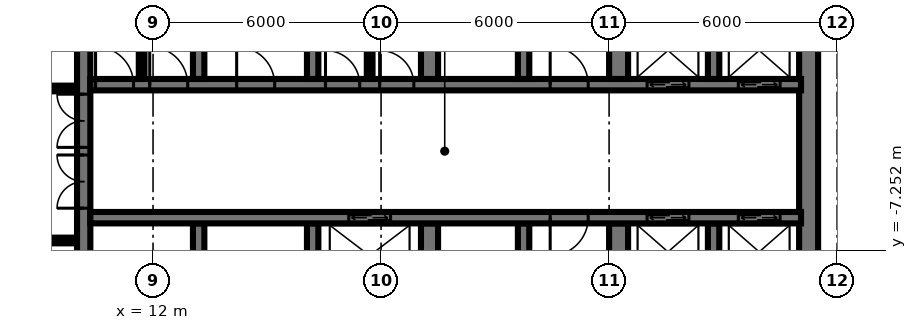
"""IFC4 building model, lengths in metres.
Left out: names, types, materials, properties, quantities, classifications, styles, units other than length and angle.
Written with IfcOpenShell. Run it as: python <this file> out.ifc"""

import sys

from ifc_helpers import new_model, si_unit, direction, frame, frame_2d, origin, place, context, subcontext, project, spatial, rectangle, extrude, element, fill, save


model = new_model("IFC4")
c1 = context("Model", 3, precision=1e-05, world=origin(), true_north=direction((0.0, 1.0)))
c2 = subcontext(c1, "Body", "Model", "MODEL_VIEW")
j1 = project(units=[si_unit("LENGTHUNIT", "METRE"), si_unit("PLANEANGLEUNIT", "RADIAN")], contexts=[c1])
p1 = place(None, origin())
s1 = spatial("IfcSite", under=j1, at=p1, CompositionType="ELEMENT")
p2 = place(p1, origin())
s2 = spatial("IfcBuilding", under=s1, at=p2, CompositionType="ELEMENT")
p3 = place(p2, frame((0.0, 0.0, 18.0)))
s3 = spatial("IfcBuildingStorey", under=s2, at=p3, CompositionType="ELEMENT", Elevation=18.0)
p4 = place(p3, frame((10.175, -14.55, 0.0), z_axis=(0.0, 0.0, 1.0), x_axis=(0.0, 1.0, 0.0)))
e1 = element("IfcWall", 1, at=p4, inside=s3, PredefinedType="SHEAR", context=c2, shape_type="SweptSolid", body=[
    extrude(rectangle(XDim=14.1, YDim=0.35, at=frame_2d((7.05, 0.0))), origin(), (0.0, 0.0, 1.0), 6.0),
])
p5 = place(p4, frame((8.4, 0.0, 0.0)))
e2 = element("IfcOpeningElement", 2, at=p5, cuts=e1, PredefinedType="OPENING", context=c2, shape_type="SweptSolid", body=[
    extrude(rectangle(XDim=1.4, YDim=2.4, at=frame_2d((0.7, 1.2))), frame((0.0, 0.185, 0.0), z_axis=(0.0, -1.0, 0.0), x_axis=(1.0, 0.0, 0.0)), (0.0, 0.0, 1.0), 0.37),
])
p6 = place(p4, frame((10.0, 0.0, 0.0)))
e3 = element("IfcOpeningElement", 3, at=p6, cuts=e1, PredefinedType="OPENING", context=c2, shape_type="SweptSolid", body=[
    extrude(rectangle(XDim=1.4, YDim=2.4, at=frame_2d((0.7, 1.2))), frame((0.0, 0.185, 0.0), z_axis=(0.0, -1.0, 0.0), x_axis=(1.0, 0.0, 0.0)), (0.0, 0.0, 1.0), 0.37),
])
p7 = place(p4, frame((4.0, 0.0, 0.0)))
e4 = element("IfcOpeningElement", 4, at=p7, cuts=e1, PredefinedType="OPENING", context=c2, shape_type="SweptSolid", body=[
    extrude(rectangle(XDim=1.2, YDim=2.1, at=frame_2d((0.6, 1.05))), frame((0.0, 0.185, 0.0), z_axis=(0.0, -1.0, 0.0), x_axis=(1.0, 0.0, 0.0)), (0.0, 0.0, 1.0), 0.37),
])
p8 = place(p3, frame((29.25, -14.55, 0.0), z_axis=(0.0, 0.0, 1.0), x_axis=(0.0, 1.0, 0.0)))
e5 = element("IfcWall", 5, at=p8, inside=s3, PredefinedType="SHEAR", context=c2, shape_type="SweptSolid", body=[
    extrude(rectangle(XDim=14.1, YDim=0.5, at=frame_2d((7.05, 0.0))), origin(), (0.0, 0.0, 1.0), 6.0),
])
p9 = place(p3, frame((10.35, -2.9, 0.0), z_axis=(0.0, 0.0, 1.0), x_axis=(1.0, 0.0, 0.0)))
e6 = element("IfcWall", 6, at=p9, inside=s3, PredefinedType="SHEAR", context=c2, shape_type="SweptSolid", body=[
    extrude(rectangle(XDim=18.7, YDim=0.3, at=frame_2d((9.35, 0.0))), origin(), (0.0, 0.0, 1.0), 6.0),
])
p10 = place(p9, frame((14.65, 0.0, 0.0)))
e7 = element("IfcOpeningElement", 7, at=p10, cuts=e6, PredefinedType="OPENING", context=c2, shape_type="SweptSolid", body=[
    extrude(rectangle(XDim=1.1, YDim=2.1, at=frame_2d((0.55, 1.05))), frame((0.0, 0.16, 0.0), z_axis=(0.0, -1.0, 0.0), x_axis=(1.0, 0.0, 0.0)), (0.0, 0.0, 1.0), 0.32),
])
p11 = place(p9, frame((17.05, 0.0, 0.0)))
e8 = element("IfcOpeningElement", 8, at=p11, cuts=e6, PredefinedType="OPENING", context=c2, shape_type="SweptSolid", body=[
    extrude(rectangle(XDim=1.1, YDim=2.1, at=frame_2d((0.55, 1.05))), frame((0.0, 0.16, 0.0), z_axis=(0.0, -1.0, 0.0), x_axis=(1.0, 0.0, 0.0)), (0.0, 0.0, 1.0), 0.32),
])
p12 = place(p9, frame((6.188, 0.0, 0.0)))
e9 = element("IfcOpeningElement", 9, at=p12, cuts=e6, PredefinedType="OPENING", context=c2, shape_type="SweptSolid", body=[
    extrude(rectangle(XDim=0.9, YDim=2.1, at=frame_2d((0.45, 1.05))), frame((0.0, 0.16, 0.0), z_axis=(0.0, -1.0, 0.0), x_axis=(1.0, 0.0, 0.0)), (0.0, 0.0, 1.0), 0.32),
])
p13 = place(p9, frame((7.613, 0.0, 0.0)))
e10 = element("IfcOpeningElement", 10, at=p13, cuts=e6, PredefinedType="OPENING", context=c2, shape_type="SweptSolid", body=[
    extrude(rectangle(XDim=0.9, YDim=2.1, at=frame_2d((0.45, 1.05))), frame((0.0, 0.16, 0.0), z_axis=(0.0, -1.0, 0.0), x_axis=(1.0, 0.0, 0.0)), (0.0, 0.0, 1.0), 0.32),
])
p14 = place(p9, frame((0.137, 0.0, 0.0)))
e11 = element("IfcOpeningElement", 11, at=p14, cuts=e6, PredefinedType="OPENING", context=c2, shape_type="SweptSolid", body=[
    extrude(rectangle(XDim=1.0, YDim=2.1, at=frame_2d((0.5, 1.05))), frame((0.0, 0.16, 0.0), z_axis=(0.0, -1.0, 0.0), x_axis=(1.0, 0.0, 0.0)), (0.0, 0.0, 1.0), 0.32),
])
p15 = place(p9, frame((1.562, 0.0, 0.0)))
e12 = element("IfcOpeningElement", 12, at=p15, cuts=e6, PredefinedType="OPENING", context=c2, shape_type="SweptSolid", body=[
    extrude(rectangle(XDim=1.0, YDim=2.1, at=frame_2d((0.5, 1.05))), frame((0.0, 0.16, 0.0), z_axis=(0.0, -1.0, 0.0), x_axis=(1.0, 0.0, 0.0)), (0.0, 0.0, 1.0), 0.32),
])
p16 = place(p9, frame((3.85, 0.0, 0.0)))
e13 = element("IfcOpeningElement", 13, at=p16, cuts=e6, PredefinedType="OPENING", context=c2, shape_type="SweptSolid", body=[
    extrude(rectangle(XDim=1.0, YDim=2.1, at=frame_2d((0.5, 1.05))), frame((0.0, 0.16, 0.0), z_axis=(0.0, -1.0, 0.0), x_axis=(1.0, 0.0, 0.0)), (0.0, 0.0, 1.0), 0.32),
])
p17 = place(p9, frame((12.1, 0.0, 0.0)))
e14 = element("IfcOpeningElement", 14, at=p17, cuts=e6, PredefinedType="OPENING", context=c2, shape_type="SweptSolid", body=[
    extrude(rectangle(XDim=1.0, YDim=2.1, at=frame_2d((0.5, 1.05))), frame((0.0, 0.16, 0.0), z_axis=(0.0, -1.0, 0.0), x_axis=(1.0, 0.0, 0.0)), (0.0, 0.0, 1.0), 0.32),
])
p18 = place(p3, frame((10.35, -6.4, 0.0), z_axis=(0.0, 0.0, 1.0), x_axis=(1.0, 0.0, 0.0)))
e15 = element("IfcWall", 15, at=p18, inside=s3, PredefinedType="SHEAR", context=c2, shape_type="SweptSolid", body=[
    extrude(rectangle(XDim=18.7, YDim=0.3, at=frame_2d((9.35, 0.0))), origin(), (0.0, 0.0, 1.0), 6.0),
])
p19 = place(p18, frame((14.65, 0.0, 0.0)))
e16 = element("IfcOpeningElement", 16, at=p19, cuts=e15, PredefinedType="OPENING", context=c2, shape_type="SweptSolid", body=[
    extrude(rectangle(XDim=1.1, YDim=2.1, at=frame_2d((0.55, 1.05))), frame((0.0, 0.16, 0.0), z_axis=(0.0, -1.0, 0.0), x_axis=(1.0, 0.0, 0.0)), (0.0, 0.0, 1.0), 0.32),
])
p20 = place(p18, frame((17.05, 0.0, 0.0)))
e17 = element("IfcOpeningElement", 17, at=p20, cuts=e15, PredefinedType="OPENING", context=c2, shape_type="SweptSolid", body=[
    extrude(rectangle(XDim=1.1, YDim=2.1, at=frame_2d((0.55, 1.05))), frame((0.0, 0.16, 0.0), z_axis=(0.0, -1.0, 0.0), x_axis=(1.0, 0.0, 0.0)), (0.0, 0.0, 1.0), 0.32),
])
p21 = place(p18, frame((6.8, 0.0, 0.0)))
e18 = element("IfcOpeningElement", 18, at=p21, cuts=e15, PredefinedType="OPENING", context=c2, shape_type="SweptSolid", body=[
    extrude(rectangle(XDim=1.1, YDim=2.1, at=frame_2d((0.55, 1.05))), frame((0.0, 0.16, 0.0), z_axis=(0.0, -1.0, 0.0), x_axis=(1.0, 0.0, 0.0)), (0.0, 0.0, 1.0), 0.32),
])
p22 = place(p18, frame((12.1, 0.0, 0.0)))
e19 = element("IfcOpeningElement", 19, at=p22, cuts=e15, PredefinedType="OPENING", context=c2, shape_type="SweptSolid", body=[
    extrude(rectangle(XDim=1.0, YDim=2.1, at=frame_2d((0.5, 1.05))), frame((0.0, 0.16, 0.0), z_axis=(0.0, -1.0, 0.0), x_axis=(1.0, 0.0, 0.0)), (0.0, 0.0, 1.0), 0.32),
])
for number, where, z_axis, x_axis in (
    (20, (13.2, -2.75, 0.0), (0.0, 0.0, 1.0), (0.0, 1.0, 0.0)),
    (21, (13.2, -8.85, 0.0), (0.0, 0.0, 1.0), (0.0, 1.0, 0.0)),
    (22, (16.2, -2.75, 0.0), (0.0, 0.0, 1.0), (0.0, 1.0, 0.0)),
    (23, (16.2, -8.85, 0.0), (0.0, 0.0, 1.0), (0.0, 1.0, 0.0)),
):
    element("IfcWall", number, at=place(p3, frame(where, z_axis=z_axis, x_axis=x_axis)), inside=s3, PredefinedType="SHEAR", context=c2, shape_type="SweptSolid", body=[
        extrude(rectangle(XDim=2.3, YDim=0.3, at=frame_2d((1.15, 0.0))), origin(), (0.0, 0.0, 1.0), 6.0),
    ])
for number, where, z_axis, x_axis in (
    (24, (19.275, -2.75, 0.0), (0.0, 0.0, 1.0), (0.0, 1.0, 0.0)),
    (25, (19.275, -8.85, 0.0), (0.0, 0.0, 1.0), (0.0, 1.0, 0.0)),
):
    element("IfcWall", number, at=place(p3, frame(where, z_axis=z_axis, x_axis=x_axis)), inside=s3, PredefinedType="SHEAR", context=c2, shape_type="SweptSolid", body=[
        extrude(rectangle(XDim=2.3, YDim=0.45, at=frame_2d((1.15, 0.0))), origin(), (0.0, 0.0, 1.0), 6.0),
    ])
for number, where, z_axis, x_axis in (
    (26, (21.75, -2.75, 0.0), (0.0, 0.0, 1.0), (0.0, 1.0, 0.0)),
    (27, (21.75, -8.85, 0.0), (0.0, 0.0, 1.0), (0.0, 1.0, 0.0)),
):
    element("IfcWall", number, at=place(p3, frame(where, z_axis=z_axis, x_axis=x_axis)), inside=s3, PredefinedType="SHEAR", context=c2, shape_type="SweptSolid", body=[
        extrude(rectangle(XDim=2.3, YDim=0.3, at=frame_2d((1.15, 0.0))), origin(), (0.0, 0.0, 1.0), 6.0),
    ])
for number, where, z_axis, x_axis in (
    (28, (24.25, -2.75, 0.0), (0.0, 0.0, 1.0), (0.0, 1.0, 0.0)),
    (29, (24.25, -8.85, 0.0), (0.0, 0.0, 1.0), (0.0, 1.0, 0.0)),
):
    element("IfcWall", number, at=place(p3, frame(where, z_axis=z_axis, x_axis=x_axis)), inside=s3, PredefinedType="SHEAR", context=c2, shape_type="SweptSolid", body=[
        extrude(rectangle(XDim=2.3, YDim=0.5, at=frame_2d((1.15, 0.0))), origin(), (0.0, 0.0, 1.0), 6.0),
    ])
for number, where, z_axis, x_axis in (
    (30, (26.75, -2.75, 0.0), (0.0, 0.0, 1.0), (0.0, 1.0, 0.0)),
    (31, (26.75, -8.85, 0.0), (0.0, 0.0, 1.0), (0.0, 1.0, 0.0)),
):
    element("IfcWall", number, at=place(p3, frame(where, z_axis=z_axis, x_axis=x_axis)), inside=s3, PredefinedType="SHEAR", context=c2, shape_type="SweptSolid", body=[
        extrude(rectangle(XDim=2.3, YDim=0.3, at=frame_2d((1.15, 0.0))), origin(), (0.0, 0.0, 1.0), 6.0),
    ])
for number, where, z_axis, x_axis in (
    (32, (17.7, -2.75, 0.0), (0.0, 0.0, 1.0), (0.0, 1.0, 0.0)),
    (33, (11.7, -2.75, 0.0), (0.0, 0.0, 1.0), (0.0, 1.0, 0.0)),
):
    element("IfcWall", number, at=place(p3, frame(where, z_axis=z_axis, x_axis=x_axis)), inside=s3, PredefinedType="PARTITIONING", context=c2, shape_type="SweptSolid", body=[
        extrude(rectangle(XDim=2.3, YDim=0.15, at=frame_2d((1.15, 0.0))), origin(), (0.0, 0.0, 1.0), 5.7),
    ])
p23 = place(p3, frame((-9.95, -7.0, 0.0), z_axis=(0.0, 0.0, 1.0), x_axis=(1.0, 0.0, 0.0)))
e34 = element("IfcWall", 34, at=p23, inside=s3, PredefinedType="PARTITIONING", context=c2, shape_type="SweptSolid", body=[
    extrude(rectangle(XDim=19.9, YDim=0.15, at=frame_2d((9.95, 0.0))), origin(), (0.0, 0.0, 1.0), 5.55),
])
p24 = place(p23, frame((9.45, 0.0, 0.0)))
e35 = element("IfcOpeningElement", 35, at=p24, cuts=e34, PredefinedType="OPENING", context=c2, shape_type="SweptSolid", body=[
    extrude(rectangle(XDim=1.0, YDim=2.1, at=frame_2d((0.5, 1.05))), frame((0.0, 0.085, 0.0), z_axis=(0.0, -1.0, 0.0), x_axis=(1.0, 0.0, 0.0)), (0.0, 0.0, 1.0), 0.17),
])
p25 = place(p23, frame((2.0, 0.0, 0.0)))
e36 = element("IfcOpeningElement", 36, at=p25, cuts=e34, PredefinedType="OPENING", context=c2, shape_type="SweptSolid", body=[
    extrude(rectangle(XDim=1.0, YDim=2.1, at=frame_2d((0.5, 1.05))), frame((0.0, 0.085, 0.0), z_axis=(0.0, -1.0, 0.0), x_axis=(1.0, 0.0, 0.0)), (0.0, 0.0, 1.0), 0.17),
])
p26 = place(p3, frame((-9.95, -3.0, 0.0), z_axis=(0.0, 0.0, 1.0), x_axis=(1.0, 0.0, 0.0)))
e37 = element("IfcWall", 37, at=p26, inside=s3, PredefinedType="PARTITIONING", context=c2, shape_type="SweptSolid", body=[
    extrude(rectangle(XDim=19.9, YDim=0.15, at=frame_2d((9.95, 0.0))), origin(), (0.0, 0.0, 1.0), 5.55),
])
p27 = place(p26, frame((2.0, 0.0, 0.0)))
e38 = element("IfcOpeningElement", 38, at=p27, cuts=e37, PredefinedType="OPENING", context=c2, shape_type="SweptSolid", body=[
    extrude(rectangle(XDim=1.0, YDim=2.1, at=frame_2d((0.5, 1.05))), frame((0.0, 0.085, 0.0), z_axis=(0.0, -1.0, 0.0), x_axis=(1.0, 0.0, 0.0)), (0.0, 0.0, 1.0), 0.17),
])
p28 = place(p26, frame((11.9, 0.0, 0.0)))
e39 = element("IfcOpeningElement", 39, at=p28, cuts=e37, PredefinedType="OPENING", context=c2, shape_type="SweptSolid", body=[
    extrude(rectangle(XDim=1.0, YDim=2.1, at=frame_2d((0.5, 1.05))), frame((0.0, 0.085, 0.0), z_axis=(0.0, -1.0, 0.0), x_axis=(1.0, 0.0, 0.0)), (0.0, 0.0, 1.0), 0.17),
])
p29 = place(p26, frame((16.9, 0.0, 0.0)))
e40 = element("IfcOpeningElement", 40, at=p29, cuts=e37, PredefinedType="OPENING", context=c2, shape_type="SweptSolid", body=[
    extrude(rectangle(XDim=1.0, YDim=2.1, at=frame_2d((0.5, 1.05))), frame((0.0, 0.085, 0.0), z_axis=(0.0, -1.0, 0.0), x_axis=(1.0, 0.0, 0.0)), (0.0, 0.0, 1.0), 0.17),
])
p30 = place(p10, origin())
e41 = element("IfcDoor", 41, at=p30, inside=s3, OperationType="DOUBLE_DOOR_SLIDING", PredefinedType="USERDEFINED", context=c2, shape_type="SweptSolid", body=[
    extrude(rectangle(XDim=1.1, YDim=2.1, at=frame_2d((0.55, 1.05))), frame((0.0, 0.025, 0.0), z_axis=(0.0, -1.0, 0.0), x_axis=(1.0, 0.0, 0.0)), (0.0, 0.0, 1.0), 0.05),
])
fill(e7, e41)
p31 = place(p11, origin())
e42 = element("IfcDoor", 42, at=p31, inside=s3, OperationType="DOUBLE_DOOR_SLIDING", PredefinedType="USERDEFINED", context=c2, shape_type="SweptSolid", body=[
    extrude(rectangle(XDim=1.1, YDim=2.1, at=frame_2d((0.55, 1.05))), frame((0.0, 0.025, 0.0), z_axis=(0.0, -1.0, 0.0), x_axis=(1.0, 0.0, 0.0)), (0.0, 0.0, 1.0), 0.05),
])
fill(e8, e42)
p32 = place(p19, origin())
e43 = element("IfcDoor", 43, at=p32, inside=s3, OperationType="DOUBLE_DOOR_SLIDING", PredefinedType="USERDEFINED", context=c2, shape_type="SweptSolid", body=[
    extrude(rectangle(XDim=1.1, YDim=2.1, at=frame_2d((0.55, 1.05))), frame((0.0, 0.025, 0.0), z_axis=(0.0, -1.0, 0.0), x_axis=(1.0, 0.0, 0.0)), (0.0, 0.0, 1.0), 0.05),
])
fill(e16, e43)
p33 = place(p20, origin())
e44 = element("IfcDoor", 44, at=p33, inside=s3, OperationType="DOUBLE_DOOR_SLIDING", PredefinedType="USERDEFINED", context=c2, shape_type="SweptSolid", body=[
    extrude(rectangle(XDim=1.1, YDim=2.1, at=frame_2d((0.55, 1.05))), frame((0.0, 0.025, 0.0), z_axis=(0.0, -1.0, 0.0), x_axis=(1.0, 0.0, 0.0)), (0.0, 0.0, 1.0), 0.05),
])
fill(e17, e44)
p34 = place(p21, origin())
e45 = element("IfcDoor", 45, at=p34, inside=s3, OperationType="DOUBLE_DOOR_SLIDING", PredefinedType="USERDEFINED", context=c2, shape_type="SweptSolid", body=[
    extrude(rectangle(XDim=1.1, YDim=2.1, at=frame_2d((0.55, 1.05))), frame((0.0, 0.025, 0.0), z_axis=(0.0, -1.0, 0.0), x_axis=(1.0, 0.0, 0.0)), (0.0, 0.0, 1.0), 0.05),
])
fill(e18, e45)
p35 = place(p5, origin())
e46 = element("IfcDoor", 46, at=p35, inside=s3, OperationType="DOUBLE_DOOR_SINGLE_SWING", PredefinedType="DOOR", context=c2, shape_type="SweptSolid", body=[
    extrude(rectangle(XDim=1.4, YDim=2.4, at=frame_2d((0.7, 1.2))), frame((0.0, 0.025, 0.0), z_axis=(0.0, -1.0, 0.0), x_axis=(1.0, 0.0, 0.0)), (0.0, 0.0, 1.0), 0.05),
])
fill(e2, e46)
p36 = place(p6, origin())
e47 = element("IfcDoor", 47, at=p36, inside=s3, OperationType="DOUBLE_DOOR_SINGLE_SWING", PredefinedType="DOOR", context=c2, shape_type="SweptSolid", body=[
    extrude(rectangle(XDim=1.4, YDim=2.4, at=frame_2d((0.7, 1.2))), frame((0.0, 0.025, 0.0), z_axis=(0.0, -1.0, 0.0), x_axis=(1.0, 0.0, 0.0)), (0.0, 0.0, 1.0), 0.05),
])
fill(e3, e47)
p37 = place(p12, origin())
e48 = element("IfcDoor", 48, at=p37, inside=s3, OperationType="SINGLE_SWING_RIGHT", PredefinedType="DOOR", context=c2, shape_type="SweptSolid", body=[
    extrude(rectangle(XDim=0.9, YDim=2.1, at=frame_2d((0.45, 1.05))), frame((0.0, 0.025, 0.0), z_axis=(0.0, -1.0, 0.0), x_axis=(1.0, 0.0, 0.0)), (0.0, 0.0, 1.0), 0.05),
])
fill(e9, e48)
p38 = place(p13, origin())
e49 = element("IfcDoor", 49, at=p38, inside=s3, OperationType="SINGLE_SWING_RIGHT", PredefinedType="DOOR", context=c2, shape_type="SweptSolid", body=[
    extrude(rectangle(XDim=0.9, YDim=2.1, at=frame_2d((0.45, 1.05))), frame((0.0, 0.025, 0.0), z_axis=(0.0, -1.0, 0.0), x_axis=(1.0, 0.0, 0.0)), (0.0, 0.0, 1.0), 0.05),
])
fill(e10, e49)
p39 = place(p14, origin())
e50 = element("IfcDoor", 50, at=p39, inside=s3, OperationType="SINGLE_SWING_RIGHT", PredefinedType="DOOR", context=c2, shape_type="SweptSolid", body=[
    extrude(rectangle(XDim=1.0, YDim=2.1, at=frame_2d((0.5, 1.05))), frame((0.0, 0.025, 0.0), z_axis=(0.0, -1.0, 0.0), x_axis=(1.0, 0.0, 0.0)), (0.0, 0.0, 1.0), 0.05),
])
fill(e11, e50)
p40 = place(p15, origin())
e51 = element("IfcDoor", 51, at=p40, inside=s3, OperationType="SINGLE_SWING_RIGHT", PredefinedType="DOOR", context=c2, shape_type="SweptSolid", body=[
    extrude(rectangle(XDim=1.0, YDim=2.1, at=frame_2d((0.5, 1.05))), frame((0.0, 0.025, 0.0), z_axis=(0.0, -1.0, 0.0), x_axis=(1.0, 0.0, 0.0)), (0.0, 0.0, 1.0), 0.05),
])
fill(e12, e51)
p41 = place(p16, origin())
e52 = element("IfcDoor", 52, at=p41, inside=s3, OperationType="SINGLE_SWING_RIGHT", PredefinedType="DOOR", context=c2, shape_type="SweptSolid", body=[
    extrude(rectangle(XDim=1.0, YDim=2.1, at=frame_2d((0.5, 1.05))), frame((0.0, 0.025, 0.0), z_axis=(0.0, -1.0, 0.0), x_axis=(1.0, 0.0, 0.0)), (0.0, 0.0, 1.0), 0.05),
])
fill(e13, e52)
p42 = place(p17, origin())
e53 = element("IfcDoor", 53, at=p42, inside=s3, OperationType="SINGLE_SWING_RIGHT", PredefinedType="DOOR", context=c2, shape_type="SweptSolid", body=[
    extrude(rectangle(XDim=1.0, YDim=2.1, at=frame_2d((0.5, 1.05))), frame((0.0, 0.025, 0.0), z_axis=(0.0, -1.0, 0.0), x_axis=(1.0, 0.0, 0.0)), (0.0, 0.0, 1.0), 0.05),
])
fill(e14, e53)
p43 = place(p22, frame((0.5, 0.0, 0.0), z_axis=(0.0, 0.0, 1.0), x_axis=(-1.0, 0.0, 0.0)))
e54 = element("IfcDoor", 54, at=p43, inside=s3, OperationType="SINGLE_SWING_LEFT", PredefinedType="DOOR", context=c2, shape_type="SweptSolid", body=[
    extrude(rectangle(XDim=1.0, YDim=2.1, at=frame_2d((0.0, 1.05))), frame((0.0, -0.025, 0.0), z_axis=(0.0, 1.0, 0.0), x_axis=(-1.0, 0.0, 0.0)), (0.0, 0.0, 1.0), 0.05),
])
fill(e19, e54)
save(model, sys.argv[1])
